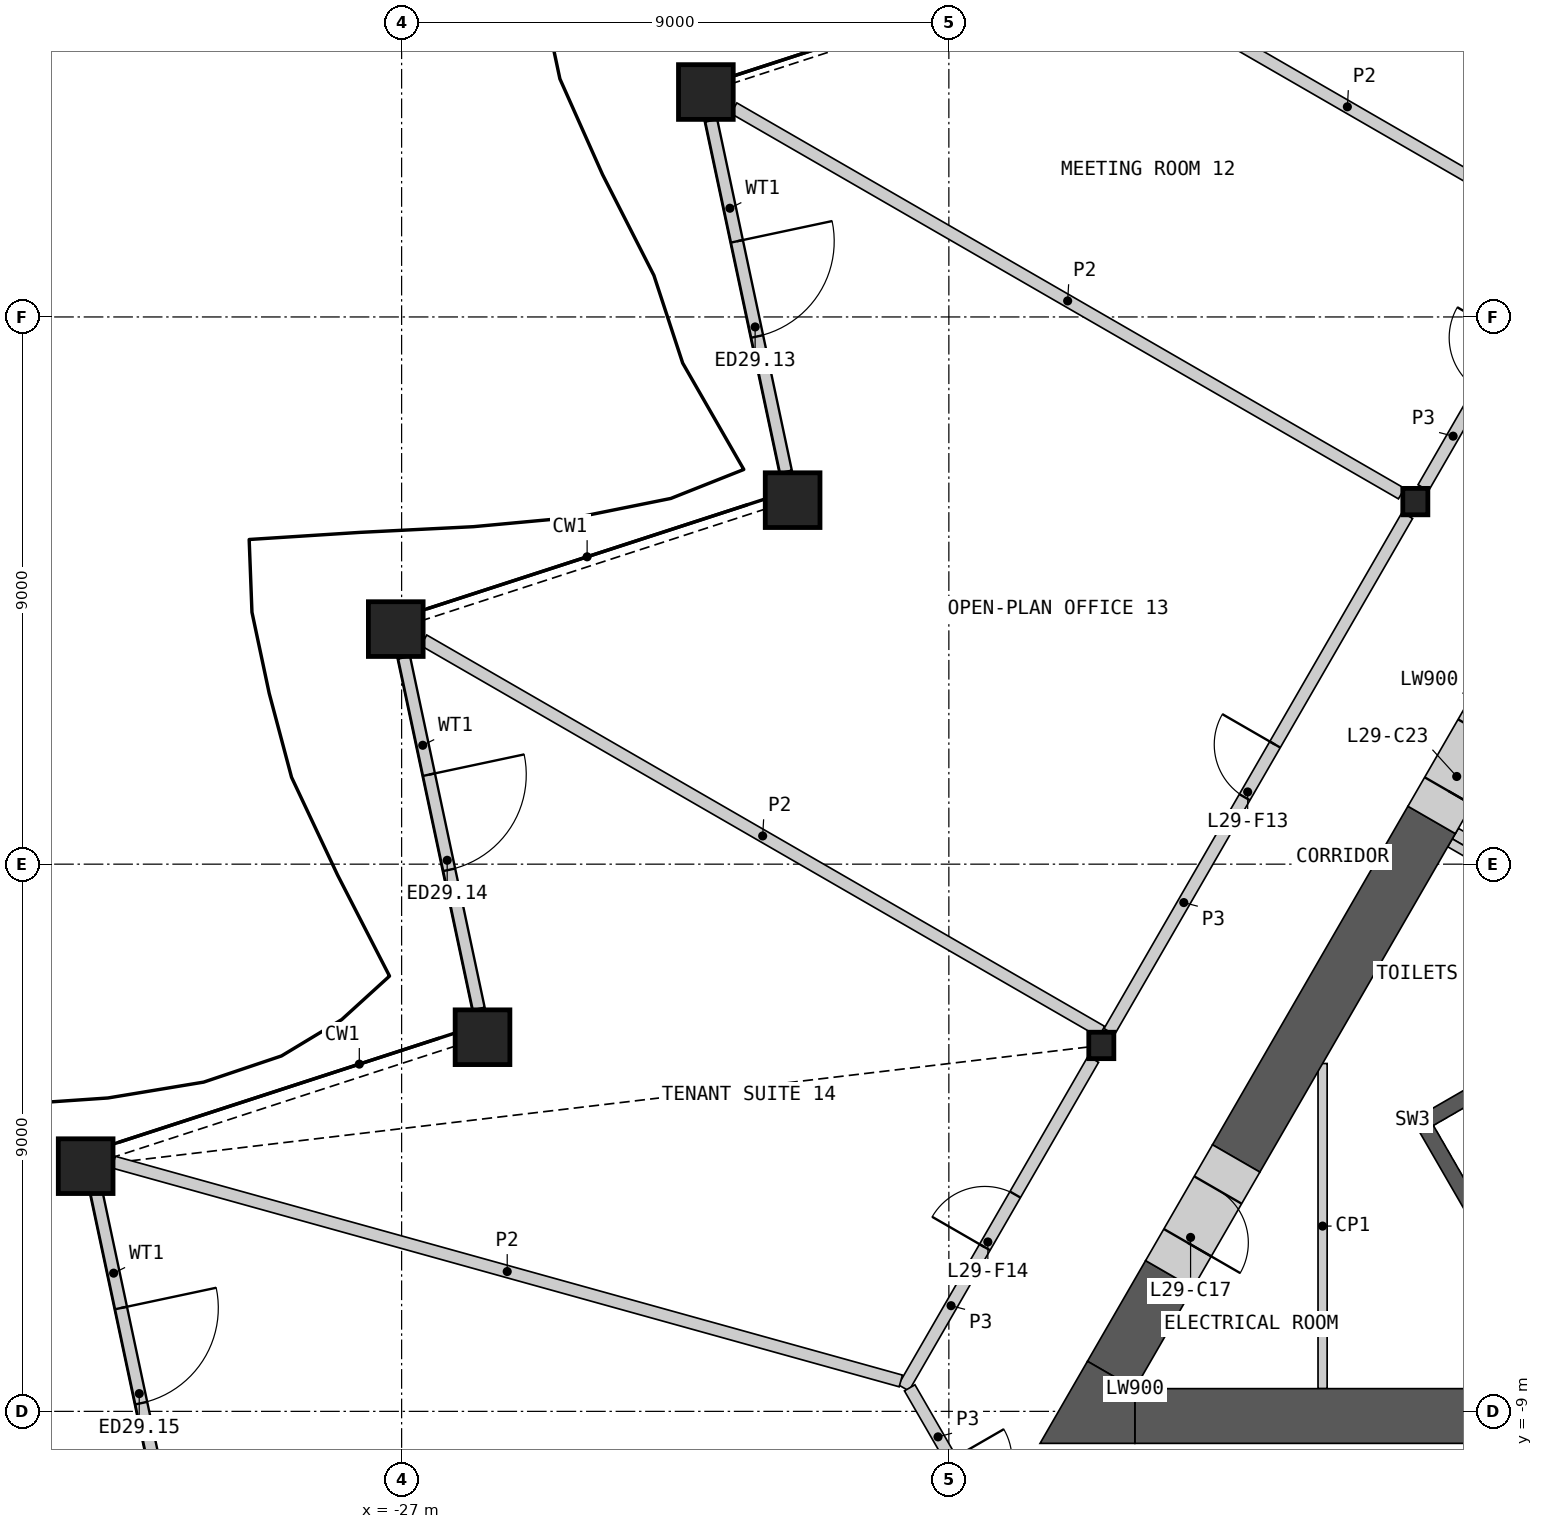
"""IFC4 building model, lengths in metres.
Left out: names, types, materials, properties, quantities, classifications, styles, units other than length and angle.
Written with IfcOpenShell. Run it as: python <this file> out.ifc"""

import sys

from ifc_helpers import new_model, si_unit, direction, frame, frame_2d, origin, origin_2d, place, context, subcontext, project, spatial, polyline, rectangle, hollow_rectangle, i_section, outline, extrude, element, fill, save


model = new_model("IFC4")
c1 = context("Model", 3, precision=1e-05, world=origin(), true_north=direction((0.0, 1.0)))
c2 = subcontext(c1, "Body", "Model", "MODEL_VIEW")
j1 = project(units=[si_unit("LENGTHUNIT", "METRE"), si_unit("PLANEANGLEUNIT", "RADIAN")], contexts=[c1])
p1 = place(None, origin())
s1 = spatial("IfcSite", under=j1, at=p1, CompositionType="ELEMENT")
p2 = place(p1, origin())
s2 = spatial("IfcBuilding", under=s1, at=p2, CompositionType="ELEMENT")
p3 = place(p2, frame((0.0, 0.0, 137.4)))
s3 = spatial("IfcBuildingStorey", under=s2, at=p3, CompositionType="ELEMENT", Elevation=137.4)
for number, where, z_axis, x_axis in (
    (1, (-21.996, 12.699, 0.0), (0.0, 0.0, 1.0), (1.0, 0.0, 0.0)),
    (2, (-20.57, 5.987, 0.0), (0.0, 0.0, 1.0), (1.0, 0.0, 0.0)),
    (3, (-27.096, 3.866, 0.0), (0.0, 0.0, 1.0), (1.0, 0.0, 0.0)),
    (4, (-25.669, -2.846, 0.0), (0.0, 0.0, 1.0), (1.0, 0.0, 0.0)),
    (5, (-32.196, -4.967, 0.0), (0.0, 0.0, 1.0), (1.0, 0.0, 0.0)),
):
    element("IfcColumn", number, at=place(p3, frame(where, z_axis=z_axis, x_axis=x_axis)), inside=s3, PredefinedType="COLUMN", context=c2, shape_type="SweptSolid", body=[
        extrude(hollow_rectangle(XDim=0.9, YDim=0.9, WallThickness=0.06, at=origin_2d()), origin(), (0.0, 0.0, 1.0), 4.2),
    ])
for number, where, z_axis, x_axis in (
    (6, (-10.328, 5.963, 0.0), (0.0, 0.0, 1.0), (1.0, 0.0, 0.0)),
    (7, (-15.493, -2.982, 0.0), (0.0, 0.0, 1.0), (1.0, 0.0, 0.0)),
):
    element("IfcColumn", number, at=place(p3, frame(where, z_axis=z_axis, x_axis=x_axis)), inside=s3, PredefinedType="COLUMN", context=c2, shape_type="SweptSolid", body=[
        extrude(i_section(OverallWidth=0.412, OverallDepth=0.435, WebThickness=0.036, FlangeThickness=0.057, at=origin_2d()), origin(), (0.0, 0.0, 1.0), 4.2),
    ])
p4 = place(p3, frame((-21.908, 12.233, 0.0), z_axis=(0.0, 0.0, 1.0), x_axis=(0.207886430801, -0.978152969575, 0.0)))
e8 = element("IfcWall", 8, at=p4, inside=s3, PredefinedType="SOLIDWALL", context=c2, shape_type="SweptSolid", body=[
    extrude(rectangle(XDim=5.908, YDim=0.2, at=frame_2d((2.954, 0.0))), origin(), (0.0, 0.0, 1.0), 3.189),
])
p5 = place(p4, frame((2.033, 0.0, 0.0)))
e9 = element("IfcOpeningElement", 9, at=p5, cuts=e8, PredefinedType="OPENING", context=c2, shape_type="SweptSolid", body=[
    extrude(rectangle(XDim=1.6, YDim=2.4, at=frame_2d((0.8, 1.2))), frame((0.0, 0.11, 0.0), z_axis=(0.0, -1.0, 0.0), x_axis=(1.0, 0.0, 0.0)), (0.0, 0.0, 1.0), 0.22),
])
p6 = place(p3, frame((-26.96, 3.401, 0.0), z_axis=(0.0, 0.0, 1.0), x_axis=(0.207883954519, -0.978153495855, 0.0)))
e10 = element("IfcWall", 10, at=p6, inside=s3, PredefinedType="SOLIDWALL", context=c2, shape_type="SweptSolid", body=[
    extrude(rectangle(XDim=5.91, YDim=0.2, at=frame_2d((2.955, 0.0))), origin(), (0.0, 0.0, 1.0), 3.189),
])
p7 = place(p6, frame((1.971, 0.0, 0.0)))
e11 = element("IfcOpeningElement", 11, at=p7, cuts=e10, PredefinedType="OPENING", context=c2, shape_type="SweptSolid", body=[
    extrude(rectangle(XDim=1.6, YDim=2.4, at=frame_2d((0.8, 1.2))), frame((0.0, 0.11, 0.0), z_axis=(0.0, -1.0, 0.0), x_axis=(1.0, 0.0, 0.0)), (0.0, 0.0, 1.0), 0.22),
])
p8 = place(p3, frame((-32.024, -5.371, 0.0), z_axis=(0.0, 0.0, 1.0), x_axis=(0.207934610169, -0.978142728795, 0.0)))
e12 = element("IfcWall", 12, at=p8, inside=s3, PredefinedType="SOLIDWALL", context=c2, shape_type="SweptSolid", body=[
    extrude(rectangle(XDim=5.543, YDim=0.2, at=frame_2d((2.771, 0.0))), origin(), (0.0, 0.0, 1.0), 3.189),
])
p9 = place(p8, frame((1.971, 0.0, 0.0)))
e13 = element("IfcOpeningElement", 13, at=p9, cuts=e12, PredefinedType="OPENING", context=c2, shape_type="SweptSolid", body=[
    extrude(rectangle(XDim=1.6, YDim=2.4, at=frame_2d((0.8, 1.2))), frame((0.0, 0.11, 0.0), z_axis=(0.0, -1.0, 0.0), x_axis=(1.0, 0.0, 0.0)), (0.0, 0.0, 1.0), 0.22),
])
p10 = place(p3, frame((-8.181, -0.357, 0.0), z_axis=(0.0, 0.0, 1.0), x_axis=(-0.866024871741, 0.500000921525, 0.0)))
e14 = element("IfcWall", 14, at=p10, inside=s3, PredefinedType="SHEAR", context=c2, shape_type="SweptSolid", body=[
    extrude(rectangle(XDim=1.72, YDim=0.2, at=frame_2d((0.86, 0.0))), origin(), (0.0, 0.0, 1.0), 3.8),
])
p11 = place(p3, origin())
e15 = element("IfcWall", 15, at=p11, inside=s3, PredefinedType="SHEAR", context=c2, shape_type="SweptSolid", body=[
    extrude(outline(polyline([(-5.307, -1.281), (-10.374, -4.206), (-10.032, -4.298), (-5.182, -1.498), (-5.307, -1.281)])), origin(), (0.0, 0.0, 1.0), 3.8),
])
p12 = place(p3, origin())
e16 = element("IfcWall", 16, at=p12, inside=s3, PredefinedType="SHEAR", context=c2, shape_type="SweptSolid", body=[
    extrude(outline(polyline([(-10.374, -4.206), (-8.83, -6.881), (-8.738, -6.539), (-10.032, -4.298), (-10.374, -4.206)])), origin(), (0.0, 0.0, 1.0), 3.8),
])
p13 = place(p3, frame((-8.268, -0.509, 0.0), z_axis=(0.0, 0.0, 1.0), x_axis=(-0.866024871741, 0.500000921525, 0.0)))
e17 = element("IfcWall", 17, at=p13, inside=s3, PredefinedType="PARTITIONING", context=c2, shape_type="SweptSolid", body=[
    extrude(rectangle(XDim=1.72, YDim=0.15, at=frame_2d((0.86, 0.0))), origin(), (0.0, 0.0, 1.0), 3.8),
])
p14 = place(p3, frame((-11.854, -8.626, 0.0), z_axis=(0.0, 0.0, 1.0), x_axis=(0.0, 1.0, 0.0)))
e18 = element("IfcWall", 18, at=p14, inside=s3, PredefinedType="PARTITIONING", context=c2, shape_type="SweptSolid", body=[
    extrude(rectangle(XDim=5.347, YDim=0.15, at=frame_2d((2.674, 0.0))), origin(), (0.0, 0.0, 1.0), 3.8),
])
p15 = place(p3, frame((-14.941, -9.076, 0.0), z_axis=(0.0, 0.0, 1.0), x_axis=(1.0, 0.0, 0.0)))
e19 = element("IfcWall", 19, at=p15, inside=s3, PredefinedType="SHEAR", context=c2, shape_type="SweptSolid", body=[
    extrude(rectangle(XDim=5.627, YDim=0.9, at=frame_2d((2.813, 0.0))), origin(), (0.0, 0.0, 1.0), 3.8),
])
p16 = place(p3, frame((-10.06, 0.728, 0.0), z_axis=(0.0, 0.0, 1.0), x_axis=(-0.500002975332, -0.866023685969, 0.0)))
e20 = element("IfcWall", 20, at=p16, inside=s3, PredefinedType="SHEAR", context=c2, shape_type="SweptSolid", body=[
    extrude(rectangle(XDim=6.429, YDim=0.9, at=frame_2d((3.214, 0.0))), origin(), (0.0, 0.0, 1.0), 3.8),
])
p17 = place(p3, frame((-14.375, -6.745, 0.0), z_axis=(0.0, 0.0, 1.0), x_axis=(-0.499928740635, -0.866066541489, 0.0)))
e21 = element("IfcWall", 21, at=p17, inside=s3, PredefinedType="SHEAR", context=c2, shape_type="SweptSolid", body=[
    extrude(rectangle(XDim=1.912, YDim=0.9, at=frame_2d((0.956, 0.0))), origin(), (0.0, 0.0, 1.0), 3.8),
])
p18 = place(p3, origin())
e22 = element("IfcWall", 22, at=p18, inside=s3, PredefinedType="SHEAR", context=c2, shape_type="SweptSolid", body=[
    extrude(outline(polyline([(-14.941, -8.626), (-14.941, -9.526), (-16.5, -9.526), (-15.721, -8.176), (-14.941, -8.626)])), origin(), (0.0, 0.0, 1.0), 3.8),
])
p19 = place(p3, frame((-13.275, -4.84, 0.0), z_axis=(0.0, 0.0, 1.0), x_axis=(-0.50002983664, -0.866008176907, 0.0)))
e23 = element("IfcWall", 23, at=p19, inside=s3, PredefinedType="SHEAR", context=c2, shape_type="SweptSolid", body=[
    extrude(rectangle(XDim=2.2, YDim=0.9, at=frame_2d((1.1, 0.0))), origin(), (0.0, 0.0, 1.0), 3.8),
])
p20 = place(p19, frame((0.6, 0.0, 0.0)))
e24 = element("IfcOpeningElement", 24, at=p20, cuts=e23, PredefinedType="OPENING", context=c2, shape_type="SweptSolid", body=[
    extrude(rectangle(XDim=1.0, YDim=2.1, at=frame_2d((0.5, 1.05))), frame((0.0, 0.46, 0.0), z_axis=(0.0, -1.0, 0.0), x_axis=(1.0, 0.0, 0.0)), (0.0, 0.0, 1.0), 0.92),
])
p21 = place(p3, frame((-8.96, 2.633, 0.0), z_axis=(0.0, 0.0, 1.0), x_axis=(-0.50002983664, -0.866008176907, 0.0)))
e25 = element("IfcWall", 25, at=p21, inside=s3, PredefinedType="SHEAR", context=c2, shape_type="SweptSolid", body=[
    extrude(rectangle(XDim=2.2, YDim=0.9, at=frame_2d((1.1, 0.0))), origin(), (0.0, 0.0, 1.0), 3.8),
])
p22 = place(p21, frame((0.55, 0.0, 0.0)))
e26 = element("IfcOpeningElement", 26, at=p22, cuts=e25, PredefinedType="OPENING", context=c2, shape_type="SweptSolid", body=[
    extrude(rectangle(XDim=1.1, YDim=2.1, at=frame_2d((0.55, 1.05))), frame((0.0, 0.46, 0.0), z_axis=(0.0, -1.0, 0.0), x_axis=(1.0, 0.0, 0.0)), (0.0, 0.0, 1.0), 0.92),
])
p23 = place(p3, frame((-15.361, -2.754, 0.0), z_axis=(0.0, 0.0, 1.0), x_axis=(0.500004141693, 0.866023012564, 0.0)))
e27 = element("IfcWall", 27, at=p23, inside=s3, PredefinedType="PARTITIONING", context=c2, shape_type="SweptSolid", body=[
    extrude(rectangle(XDim=9.803, YDim=0.2, at=frame_2d((4.902, 0.0))), origin(), (0.0, 0.0, 1.0), 3.8),
])
p24 = place(p23, frame((4.452, 0.0, 0.0)))
e28 = element("IfcOpeningElement", 28, at=p24, cuts=e27, PredefinedType="OPENING", context=c2, shape_type="SweptSolid", body=[
    extrude(rectangle(XDim=1.0, YDim=2.1, at=frame_2d((0.5, 1.05))), frame((0.0, 0.11, 0.0), z_axis=(0.0, -1.0, 0.0), x_axis=(1.0, 0.0, 0.0)), (0.0, 0.0, 1.0), 0.22),
])
p25 = place(p3, frame((-10.197, 6.19, 0.0), z_axis=(0.0, 0.0, 1.0), x_axis=(0.500012035596, 0.866018454918, 0.0)))
e29 = element("IfcWall", 29, at=p25, inside=s3, PredefinedType="PARTITIONING", context=c2, shape_type="SweptSolid", body=[
    extrude(rectangle(XDim=9.803, YDim=0.2, at=frame_2d((4.902, 0.0))), origin(), (0.0, 0.0, 1.0), 3.8),
])
p26 = place(p25, frame((6.853, 0.0, 0.0)))
e30 = element("IfcOpeningElement", 30, at=p26, cuts=e29, PredefinedType="OPENING", context=c2, shape_type="SweptSolid", body=[
    extrude(rectangle(XDim=1.0, YDim=2.1, at=frame_2d((0.5, 1.05))), frame((0.0, 0.11, 0.0), z_axis=(0.0, -1.0, 0.0), x_axis=(1.0, 0.0, 0.0)), (0.0, 0.0, 1.0), 0.22),
])
p27 = place(p25, frame((1.851, 0.0, 0.0)))
e31 = element("IfcOpeningElement", 31, at=p27, cuts=e29, PredefinedType="OPENING", context=c2, shape_type="SweptSolid", body=[
    extrude(rectangle(XDim=1.0, YDim=2.1, at=frame_2d((0.5, 1.05))), frame((0.0, 0.11, 0.0), z_axis=(0.0, -1.0, 0.0), x_axis=(1.0, 0.0, 0.0)), (0.0, 0.0, 1.0), 0.22),
])
p28 = place(p3, frame((-18.744, -8.613, 0.0), z_axis=(0.0, 0.0, 1.0), x_axis=(0.499997920671, 0.866026604282, 0.0)))
e32 = element("IfcWall", 32, at=p28, inside=s3, PredefinedType="PARTITIONING", context=c2, shape_type="SweptSolid", body=[
    extrude(rectangle(XDim=6.24, YDim=0.2, at=frame_2d((3.12, 0.0))), origin(), (0.0, 0.0, 1.0), 3.8),
])
p29 = place(p28, frame((2.67, 0.0, 0.0)))
e33 = element("IfcOpeningElement", 33, at=p29, cuts=e32, PredefinedType="OPENING", context=c2, shape_type="SweptSolid", body=[
    extrude(rectangle(XDim=1.0, YDim=2.1, at=frame_2d((0.5, 1.05))), frame((0.0, 0.11, 0.0), z_axis=(0.0, -1.0, 0.0), x_axis=(1.0, 0.0, 0.0)), (0.0, 0.0, 1.0), 0.22),
])
p30 = place(p3, frame((-18.644, -8.613, 0.0), z_axis=(0.0, 0.0, 1.0), x_axis=(0.499958791762, -0.866049194065, 0.0)))
e34 = element("IfcWall", 34, at=p30, inside=s3, PredefinedType="PARTITIONING", context=c2, shape_type="SweptSolid", body=[
    extrude(rectangle(XDim=3.726, YDim=0.2, at=frame_2d((1.863, 0.0))), origin(), (0.0, 0.0, 1.0), 3.8),
])
p31 = place(p30, frame((1.363, 0.0, 0.0)))
e35 = element("IfcOpeningElement", 35, at=p31, cuts=e34, PredefinedType="OPENING", context=c2, shape_type="SweptSolid", body=[
    extrude(rectangle(XDim=1.0, YDim=2.1, at=frame_2d((0.5, 1.05))), frame((0.0, 0.11, 0.0), z_axis=(0.0, -1.0, 0.0), x_axis=(1.0, 0.0, 0.0)), (0.0, 0.0, 1.0), 0.22),
])
p32 = place(p3, frame((-31.736, -4.901, 0.0), z_axis=(0.0, 0.0, 1.0), x_axis=(0.963468434011, -0.267821912219, 0.0)))
e36 = element("IfcWall", 36, at=p32, inside=s3, PredefinedType="PARTITIONING", context=c2, shape_type="SweptSolid", body=[
    extrude(rectangle(XDim=13.437, YDim=0.2, at=frame_2d((6.718, 0.0))), origin(), (0.0, 0.0, 1.0), 2.885),
])
p33 = place(p3, frame((-26.636, 3.682, 0.0), z_axis=(0.0, 0.0, 1.0), x_axis=(0.866026411352, -0.499998254837, 0.0)))
e37 = element("IfcWall", 37, at=p33, inside=s3, PredefinedType="PARTITIONING", context=c2, shape_type="SweptSolid", body=[
    extrude(rectangle(XDim=12.873, YDim=0.2, at=frame_2d((6.437, 0.0))), origin(), (0.0, 0.0, 1.0), 2.885),
])
p34 = place(p3, frame((-21.536, 12.434, 0.0), z_axis=(0.0, 0.0, 1.0), x_axis=(0.86602461759, -0.500001361726, 0.0)))
e38 = element("IfcWall", 38, at=p34, inside=s3, PredefinedType="PARTITIONING", context=c2, shape_type="SweptSolid", body=[
    extrude(rectangle(XDim=12.679, YDim=0.2, at=frame_2d((6.34, 0.0))), origin(), (0.0, 0.0, 1.0), 2.885),
])
p35 = place(p3, frame((-15.01, 14.514, 0.0), z_axis=(0.0, 0.0, 1.0), x_axis=(0.866018103232, -0.500012644715, 0.0)))
e39 = element("IfcWall", 39, at=p35, inside=s3, PredefinedType="PARTITIONING", context=c2, shape_type="SweptSolid", body=[
    extrude(rectangle(XDim=8.229, YDim=0.2, at=frame_2d((4.115, 0.0))), origin(), (0.0, 0.0, 1.0), 2.885),
])
p36 = place(p5, origin())
e40 = element("IfcDoor", 40, at=p36, inside=s3, OperationType="DOUBLE_DOOR_SINGLE_SWING", PredefinedType="DOOR", context=c2, shape_type="SweptSolid", body=[
    extrude(rectangle(XDim=1.6, YDim=2.4, at=frame_2d((0.8, 1.2))), frame((0.0, 0.025, 0.0), z_axis=(0.0, -1.0, 0.0), x_axis=(1.0, 0.0, 0.0)), (0.0, 0.0, 1.0), 0.05),
])
fill(e9, e40)
p37 = place(p7, origin())
e41 = element("IfcDoor", 41, at=p37, inside=s3, OperationType="DOUBLE_DOOR_SINGLE_SWING", PredefinedType="DOOR", context=c2, shape_type="SweptSolid", body=[
    extrude(rectangle(XDim=1.6, YDim=2.4, at=frame_2d((0.8, 1.2))), frame((0.0, 0.025, 0.0), z_axis=(0.0, -1.0, 0.0), x_axis=(1.0, 0.0, 0.0)), (0.0, 0.0, 1.0), 0.05),
])
fill(e11, e41)
p38 = place(p9, origin())
e42 = element("IfcDoor", 42, at=p38, inside=s3, OperationType="DOUBLE_DOOR_SINGLE_SWING", PredefinedType="DOOR", context=c2, shape_type="SweptSolid", body=[
    extrude(rectangle(XDim=1.6, YDim=2.4, at=frame_2d((0.8, 1.2))), frame((0.0, 0.025, 0.0), z_axis=(0.0, -1.0, 0.0), x_axis=(1.0, 0.0, 0.0)), (0.0, 0.0, 1.0), 0.05),
])
fill(e13, e42)
p39 = place(p20, origin())
e43 = element("IfcDoor", 43, at=p39, inside=s3, OperationType="SINGLE_SWING_RIGHT", PredefinedType="DOOR", context=c2, shape_type="SweptSolid", body=[
    extrude(rectangle(XDim=1.0, YDim=2.1, at=frame_2d((0.5, 1.05))), frame((0.0, 0.205, 0.0), z_axis=(0.0, -1.0, 0.0), x_axis=(1.0, 0.0, 0.0)), (0.0, 0.0, 1.0), 0.05),
])
fill(e24, e43)
p40 = place(p22, origin())
e44 = element("IfcDoor", 44, at=p40, inside=s3, OperationType="SINGLE_SWING_RIGHT", PredefinedType="DOOR", context=c2, shape_type="SweptSolid", body=[
    extrude(rectangle(XDim=1.1, YDim=2.1, at=frame_2d((0.55, 1.05))), frame((0.0, 0.205, 0.0), z_axis=(0.0, -1.0, 0.0), x_axis=(1.0, 0.0, 0.0)), (0.0, 0.0, 1.0), 0.05),
])
fill(e26, e44)
p41 = place(p24, origin())
e45 = element("IfcDoor", 45, at=p41, inside=s3, OperationType="SINGLE_SWING_RIGHT", PredefinedType="DOOR", context=c2, shape_type="SweptSolid", body=[
    extrude(rectangle(XDim=1.0, YDim=2.1, at=frame_2d((0.5, 1.05))), frame((0.0, 0.025, 0.0), z_axis=(0.0, -1.0, 0.0), x_axis=(1.0, 0.0, 0.0)), (0.0, 0.0, 1.0), 0.05),
])
fill(e28, e45)
p42 = place(p29, origin())
e46 = element("IfcDoor", 46, at=p42, inside=s3, OperationType="SINGLE_SWING_LEFT", PredefinedType="DOOR", context=c2, shape_type="SweptSolid", body=[
    extrude(rectangle(XDim=1.0, YDim=2.1, at=frame_2d((0.5, 1.05))), frame((0.0, 0.025, 0.0), z_axis=(0.0, -1.0, 0.0), x_axis=(1.0, 0.0, 0.0)), (0.0, 0.0, 1.0), 0.05),
])
fill(e33, e46)
save(model, sys.argv[1])
